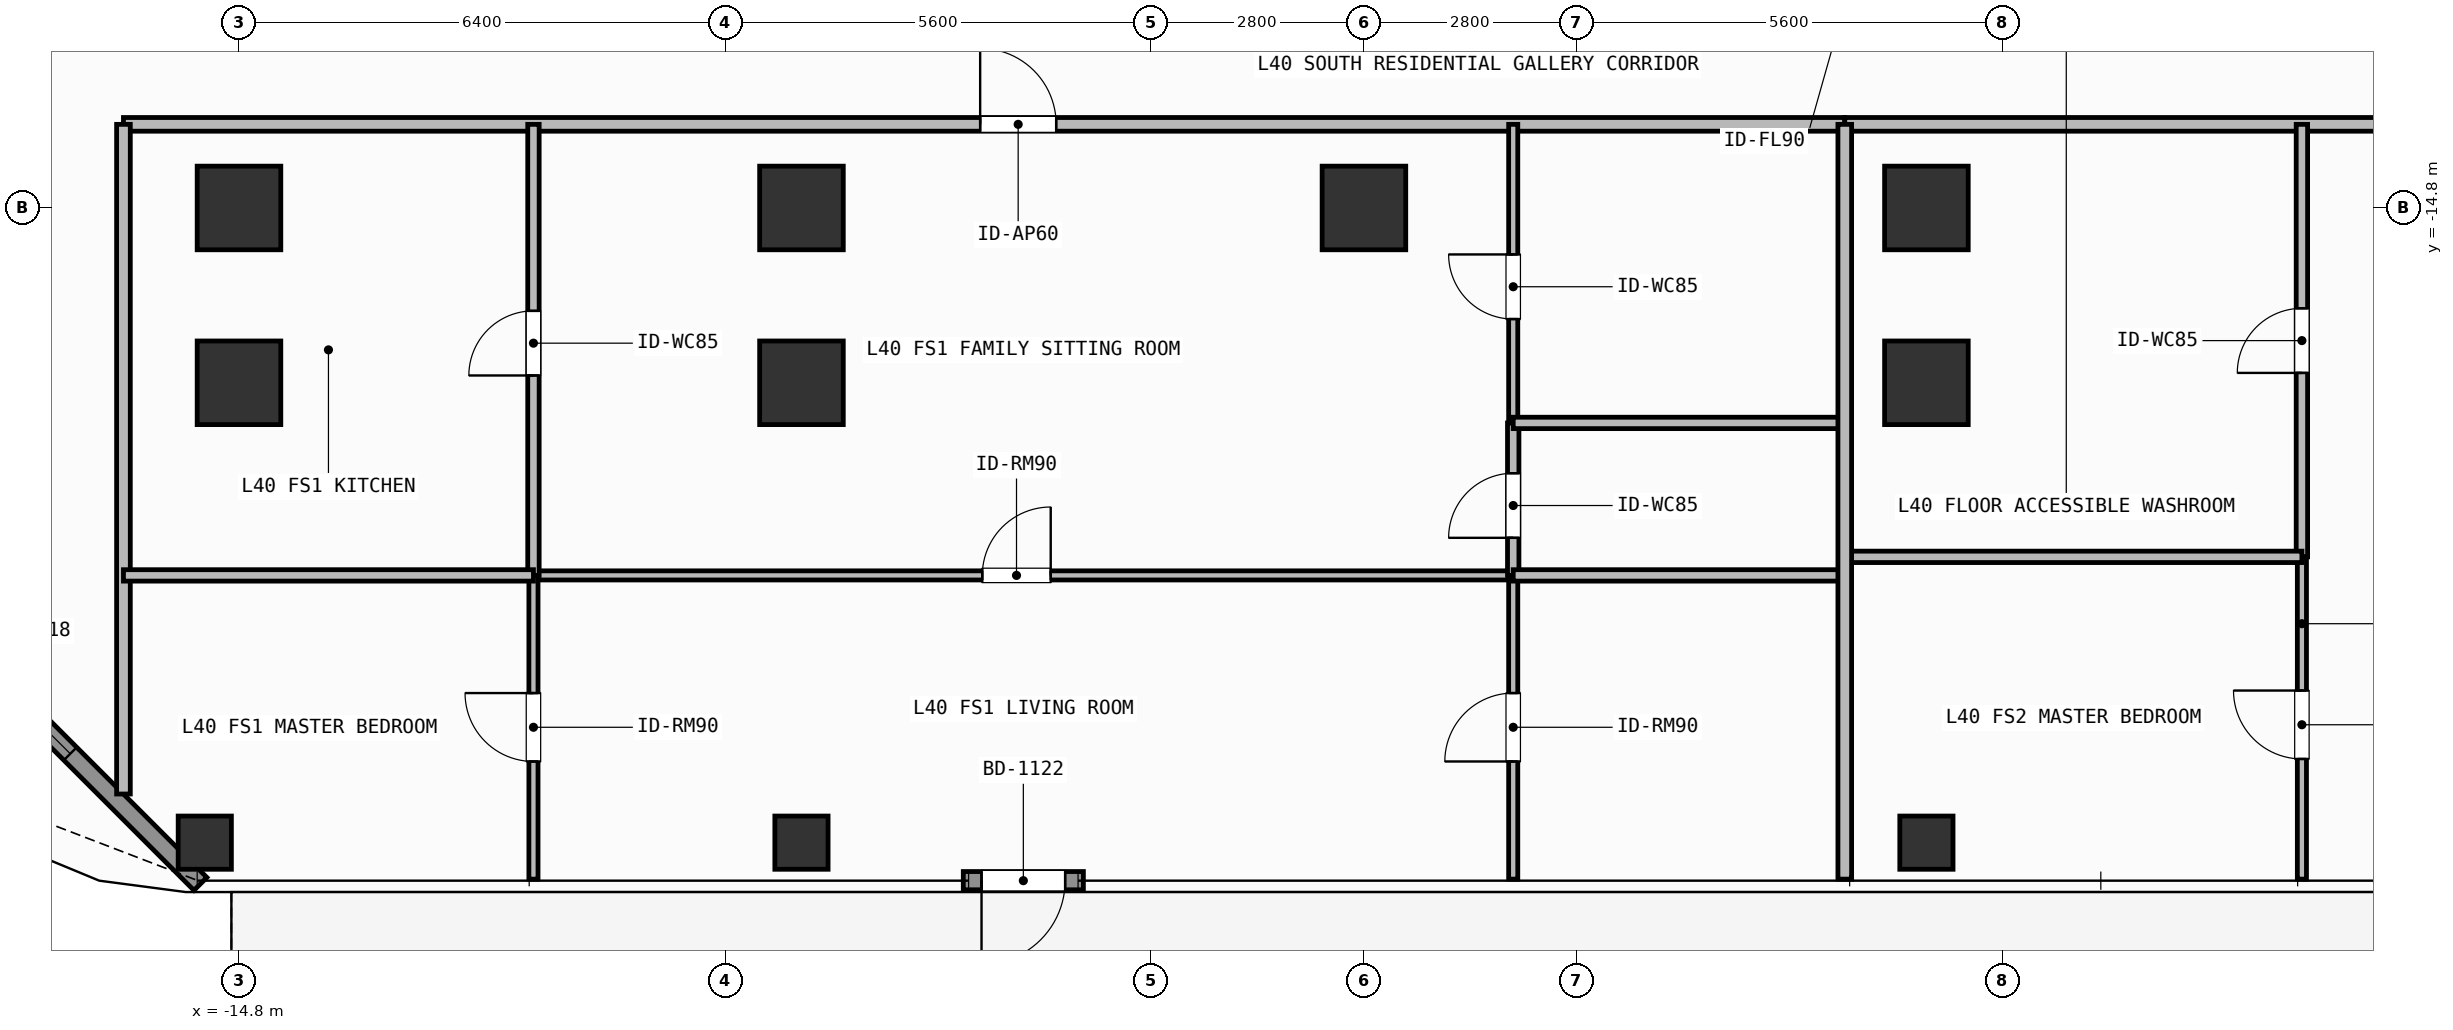
"""IFC4 building model, lengths in metres.
Left out: names, types, materials, properties, quantities, classifications, styles, units other than length and angle.
Written with IfcOpenShell. Run it as: python <this file> out.ifc"""

import sys

from ifc_helpers import new_model, si_unit, direction, frame, frame_2d, origin, origin_2d, place, context, subcontext, project, spatial, rectangle, hollow_rectangle, extrude, element, fill, save


model = new_model("IFC4")
c1 = context("Model", 3, precision=1e-05, world=origin(), true_north=direction((0.0, 1.0)))
c2 = subcontext(c1, "Body", "Model", "MODEL_VIEW")
j1 = project(units=[si_unit("LENGTHUNIT", "METRE"), si_unit("PLANEANGLEUNIT", "RADIAN")], contexts=[c1])
p1 = place(None, origin())
s1 = spatial("IfcSite", under=j1, at=p1, CompositionType="ELEMENT")
p2 = place(p1, origin())
s2 = spatial("IfcBuilding", under=s1, at=p2, CompositionType="ELEMENT")
p3 = place(p2, frame((0.0, 0.0, 164.1)))
s3 = spatial("IfcBuildingStorey", under=s2, at=p3, CompositionType="ELEMENT", Elevation=164.1)
for number, where, z_axis, x_axis in (
    (1, (-14.8, -14.8, 0.0), (0.0, 0.0, 1.0), (1.0, 0.0, 0.0)),
    (2, (-7.4, -14.8, 0.0), (0.0, 0.0, 1.0), (1.0, 0.0, 0.0)),
    (3, (0.0, -14.8, 0.0), (0.0, 0.0, 1.0), (1.0, 0.0, 0.0)),
    (4, (7.4, -14.8, 0.0), (0.0, 0.0, 1.0), (1.0, 0.0, 0.0)),
    (5, (-14.8, -17.1, 0.0), (0.0, 0.0, 1.0), (1.0, 0.0, 0.0)),
    (6, (-7.4, -17.1, 0.0), (0.0, 0.0, 1.0), (1.0, 0.0, 0.0)),
    (7, (7.4, -17.1, 0.0), (0.0, 0.0, 1.0), (1.0, 0.0, 0.0)),
):
    element("IfcColumn", number, at=place(p3, frame(where, z_axis=z_axis, x_axis=x_axis)), inside=s3, PredefinedType="COLUMN", context=c2, shape_type="SweptSolid", body=[
        extrude(rectangle(XDim=1.1, YDim=1.1, at=origin_2d()), origin(), (0.0, 0.0, 1.0), 3.9),
    ])
for number, where, z_axis, x_axis in (
    (8, (-15.25, -23.15, 0.0), (0.0, 0.0, 1.0), (1.0, 0.0, 0.0)),
    (9, (-7.4, -23.15, 0.0), (0.0, 0.0, 1.0), (1.0, 0.0, 0.0)),
    (10, (7.4, -23.15, 0.0), (0.0, 0.0, 1.0), (1.0, 0.0, 0.0)),
):
    element("IfcColumn", number, at=place(p3, frame(where, z_axis=z_axis, x_axis=x_axis)), inside=s3, PredefinedType="COLUMN", context=c2, shape_type="SweptSolid", body=[
        extrude(hollow_rectangle(XDim=0.7, YDim=0.7, WallThickness=0.032, at=origin_2d()), origin(), (0.0, 0.0, 1.0), 3.9),
    ])
p4 = place(p3, frame((-3.691, -23.65, 0.0), z_axis=(0.0, 0.0, 1.0), x_axis=(-1.0, 0.0, 0.0)))
e11 = element("IfcWall", 11, at=p4, inside=s3, PredefinedType="SOLIDWALL", context=c2, shape_type="SweptSolid", body=[
    extrude(rectangle(XDim=1.58, YDim=0.24, at=frame_2d((0.79, 0.0))), origin(), (0.0, 0.0, 1.0), 3.62),
])
p5 = place(p4, frame((0.24, 0.0, 0.0)))
e12 = element("IfcOpeningElement", 12, at=p5, cuts=e11, PredefinedType="OPENING", context=c2, shape_type="SweptSolid", body=[
    extrude(rectangle(XDim=1.1, YDim=2.2, at=frame_2d((0.55, 1.1))), frame((0.0, 0.13, 0.0), z_axis=(0.0, -1.0, 0.0), x_axis=(1.0, 0.0, 0.0)), (0.0, 0.0, 1.0), 0.26),
])
p6 = place(p3, frame((-15.308, -23.692, 0.0), z_axis=(0.0, 0.0, 1.0), x_axis=(-0.707106781187, 0.707106781187, 0.0)))
e13 = element("IfcWall", 13, at=p6, inside=s3, PredefinedType="SOLIDWALL", context=c2, shape_type="SweptSolid", body=[
    extrude(rectangle(XDim=6.343, YDim=0.24, at=frame_2d((3.171, 0.0))), origin(), (0.0, 0.0, 1.0), 3.62),
])
p7 = place(p6, frame((2.421, 0.0, 0.8)))
e14 = element("IfcOpeningElement", 14, at=p7, cuts=e13, PredefinedType="OPENING", context=c2, shape_type="SweptSolid", body=[
    extrude(rectangle(XDim=1.5, YDim=1.85, at=frame_2d((0.75, 0.925))), frame((0.0, 0.13, 0.0), z_axis=(0.0, -1.0, 0.0), x_axis=(1.0, 0.0, 0.0)), (0.0, 0.0, 1.0), 0.26),
])
p8 = place(p3, frame((-16.32, -13.7, 0.0), z_axis=(0.0, 0.0, 1.0), x_axis=(1.0, 0.0, 0.0)))
e15 = element("IfcWall", 15, at=p8, inside=s3, PredefinedType="PARTITIONING", context=c2, shape_type="SweptSolid", body=[
    extrude(rectangle(XDim=22.646, YDim=0.18, at=frame_2d((11.323, 0.0))), origin(), (0.0, 0.0, 1.0), 3.62),
])
p9 = place(p8, frame((11.271, 0.0, 0.0)))
e16 = element("IfcOpeningElement", 16, at=p9, cuts=e15, PredefinedType="OPENING", context=c2, shape_type="SweptSolid", body=[
    extrude(rectangle(XDim=1.0, YDim=2.2, at=frame_2d((0.5, 1.1))), frame((0.0, 0.1, 0.0), z_axis=(0.0, -1.0, 0.0), x_axis=(1.0, 0.0, 0.0)), (0.0, 0.0, 1.0), 0.2),
])
p10 = place(p3, frame((-10.926, -19.634, 0.0), z_axis=(0.0, 0.0, 1.0), x_axis=(1.0, 0.0, 0.0)))
e17 = element("IfcWall", 17, at=p10, inside=s3, PredefinedType="PARTITIONING", context=c2, shape_type="SweptSolid", body=[
    extrude(rectangle(XDim=12.89, YDim=0.12, at=frame_2d((6.445, 0.0))), origin(), (0.0, 0.0, 1.0), 3.62),
])
p11 = place(p10, frame((5.905, 0.0, 0.0)))
e18 = element("IfcOpeningElement", 18, at=p11, cuts=e17, PredefinedType="OPENING", context=c2, shape_type="SweptSolid", body=[
    extrude(rectangle(XDim=0.9, YDim=2.1, at=frame_2d((0.45, 1.05))), frame((0.0, 0.07, 0.0), z_axis=(0.0, -1.0, 0.0), x_axis=(1.0, 0.0, 0.0)), (0.0, 0.0, 1.0), 0.14),
])
p12 = place(p3, frame((-10.926, -19.634, 0.0), z_axis=(0.0, 0.0, 1.0), x_axis=(0.0, 1.0, 0.0)))
e19 = element("IfcWall", 19, at=p12, inside=s3, PredefinedType="PARTITIONING", context=c2, shape_type="SweptSolid", body=[
    extrude(rectangle(XDim=5.934, YDim=0.15, at=frame_2d((2.967, 0.0))), origin(), (0.0, 0.0, 1.0), 3.31),
])
p13 = place(p12, frame((2.63, 0.0, 0.0)))
e20 = element("IfcOpeningElement", 20, at=p13, cuts=e19, PredefinedType="OPENING", context=c2, shape_type="SweptSolid", body=[
    extrude(rectangle(XDim=0.85, YDim=2.1, at=frame_2d((0.425, 1.05))), frame((0.0, 0.085, 0.0), z_axis=(0.0, -1.0, 0.0), x_axis=(1.0, 0.0, 0.0)), (0.0, 0.0, 1.0), 0.17),
])
p14 = place(p3, frame((-10.926, -23.63, 0.0), z_axis=(0.0, 0.0, 1.0), x_axis=(0.0, 1.0, 0.0)))
e21 = element("IfcWall", 21, at=p14, inside=s3, PredefinedType="PARTITIONING", context=c2, shape_type="SweptSolid", body=[
    extrude(rectangle(XDim=3.996, YDim=0.12, at=frame_2d((1.998, 0.0))), origin(), (0.0, 0.0, 1.0), 3.31),
])
p15 = place(p14, frame((1.548, 0.0, 0.0)))
e22 = element("IfcOpeningElement", 22, at=p15, cuts=e21, PredefinedType="OPENING", context=c2, shape_type="SweptSolid", body=[
    extrude(rectangle(XDim=0.9, YDim=2.1, at=frame_2d((0.45, 1.05))), frame((0.0, 0.07, 0.0), z_axis=(0.0, -1.0, 0.0), x_axis=(1.0, 0.0, 0.0)), (0.0, 0.0, 1.0), 0.14),
])
p16 = place(p3, frame((1.964, -19.634, 0.0), z_axis=(0.0, 0.0, 1.0), x_axis=(0.0, 1.0, 0.0)))
e23 = element("IfcWall", 23, at=p16, inside=s3, PredefinedType="PARTITIONING", context=c2, shape_type="SweptSolid", body=[
    extrude(rectangle(XDim=2.006, YDim=0.15, at=frame_2d((1.003, 0.0))), origin(), (0.0, 0.0, 1.0), 3.62),
])
p17 = place(p16, frame((0.494, 0.0, 0.0)))
e24 = element("IfcOpeningElement", 24, at=p17, cuts=e23, PredefinedType="OPENING", context=c2, shape_type="SweptSolid", body=[
    extrude(rectangle(XDim=0.85, YDim=2.1, at=frame_2d((0.425, 1.05))), frame((0.0, 0.085, 0.0), z_axis=(0.0, -1.0, 0.0), x_axis=(1.0, 0.0, 0.0)), (0.0, 0.0, 1.0), 0.17),
])
p18 = place(p3, frame((1.964, -17.628, 0.0), z_axis=(0.0, 0.0, 1.0), x_axis=(0.0, 1.0, 0.0)))
e25 = element("IfcWall", 25, at=p18, inside=s3, PredefinedType="PARTITIONING", context=c2, shape_type="SweptSolid", body=[
    extrude(rectangle(XDim=3.928, YDim=0.12, at=frame_2d((1.964, 0.0))), origin(), (0.0, 0.0, 1.0), 3.62),
])
p19 = place(p18, frame((1.367, 0.0, 0.0)))
e26 = element("IfcOpeningElement", 26, at=p19, cuts=e25, PredefinedType="OPENING", context=c2, shape_type="SweptSolid", body=[
    extrude(rectangle(XDim=0.85, YDim=2.1, at=frame_2d((0.425, 1.05))), frame((0.0, 0.07, 0.0), z_axis=(0.0, -1.0, 0.0), x_axis=(1.0, 0.0, 0.0)), (0.0, 0.0, 1.0), 0.14),
])
p20 = place(p3, frame((1.964, -23.63, 0.0), z_axis=(0.0, 0.0, 1.0), x_axis=(0.0, 1.0, 0.0)))
e27 = element("IfcWall", 27, at=p20, inside=s3, PredefinedType="PARTITIONING", context=c2, shape_type="SweptSolid", body=[
    extrude(rectangle(XDim=3.996, YDim=0.12, at=frame_2d((1.998, 0.0))), origin(), (0.0, 0.0, 1.0), 3.62),
])
p21 = place(p20, frame((1.548, 0.0, 0.0)))
e28 = element("IfcOpeningElement", 28, at=p21, cuts=e27, PredefinedType="OPENING", context=c2, shape_type="SweptSolid", body=[
    extrude(rectangle(XDim=0.9, YDim=2.1, at=frame_2d((0.45, 1.05))), frame((0.0, 0.07, 0.0), z_axis=(0.0, -1.0, 0.0), x_axis=(1.0, 0.0, 0.0)), (0.0, 0.0, 1.0), 0.14),
])
p22 = place(p3, frame((6.326, -13.7, 0.0), z_axis=(0.0, 0.0, 1.0), x_axis=(1.0, 0.0, 0.0)))
e29 = element("IfcWall", 29, at=p22, inside=s3, PredefinedType="PARTITIONING", context=c2, shape_type="SweptSolid", body=[
    extrude(rectangle(XDim=17.794, YDim=0.18, at=frame_2d((8.897, 0.0))), origin(), (0.0, 0.0, 1.0), 3.62),
])
p23 = place(p22, frame((9.113, 0.0, 0.0)))
e30 = element("IfcOpeningElement", 30, at=p23, cuts=e29, PredefinedType="OPENING", context=c2, shape_type="SweptSolid", body=[
    extrude(rectangle(XDim=1.0, YDim=2.2, at=frame_2d((0.5, 1.1))), frame((0.0, 0.1, 0.0), z_axis=(0.0, -1.0, 0.0), x_axis=(1.0, 0.0, 0.0)), (0.0, 0.0, 1.0), 0.2),
])
p24 = place(p3, frame((12.34, -19.39, 0.0), z_axis=(0.0, 0.0, 1.0), x_axis=(0.0, 1.0, 0.0)))
e31 = element("IfcWall", 31, at=p24, inside=s3, PredefinedType="PARTITIONING", context=c2, shape_type="SweptSolid", body=[
    extrude(rectangle(XDim=5.69, YDim=0.15, at=frame_2d((2.845, 0.0))), origin(), (0.0, 0.0, 1.0), 3.62),
])
p25 = place(p24, frame((2.42, 0.0, 0.0)))
e32 = element("IfcOpeningElement", 32, at=p25, cuts=e31, PredefinedType="OPENING", context=c2, shape_type="SweptSolid", body=[
    extrude(rectangle(XDim=0.85, YDim=2.1, at=frame_2d((0.425, 1.05))), frame((0.0, 0.085, 0.0), z_axis=(0.0, -1.0, 0.0), x_axis=(1.0, 0.0, 0.0)), (0.0, 0.0, 1.0), 0.17),
])
p26 = place(p3, frame((12.34, -23.63, 0.0), z_axis=(0.0, 0.0, 1.0), x_axis=(0.0, 1.0, 0.0)))
e33 = element("IfcWall", 33, at=p26, inside=s3, PredefinedType="PARTITIONING", context=c2, shape_type="SweptSolid", body=[
    extrude(rectangle(XDim=4.24, YDim=0.12, at=frame_2d((2.12, 0.0))), origin(), (0.0, 0.0, 1.0), 3.62),
])
p27 = place(p26, frame((1.581, 0.0, 0.0)))
e34 = element("IfcOpeningElement", 34, at=p27, cuts=e33, PredefinedType="OPENING", context=c2, shape_type="SweptSolid", body=[
    extrude(rectangle(XDim=0.9, YDim=2.1, at=frame_2d((0.45, 1.05))), frame((0.0, 0.07, 0.0), z_axis=(0.0, -1.0, 0.0), x_axis=(1.0, 0.0, 0.0)), (0.0, 0.0, 1.0), 0.14),
])
p28 = place(p3, frame((-16.32, -22.51, 0.0), z_axis=(0.0, 0.0, 1.0), x_axis=(0.0, 1.0, 0.0)))
e35 = element("IfcWall", 35, at=p28, inside=s3, PredefinedType="PARTITIONING", context=c2, shape_type="SweptSolid", body=[
    extrude(rectangle(XDim=8.81, YDim=0.18, at=frame_2d((4.405, 0.0))), origin(), (0.0, 0.0, 1.0), 3.62),
])
p29 = place(p3, frame((-16.32, -19.634, 0.0), z_axis=(0.0, 0.0, 1.0), x_axis=(1.0, 0.0, 0.0)))
e36 = element("IfcWall", 36, at=p29, inside=s3, PredefinedType="PARTITIONING", context=c2, shape_type="SweptSolid", body=[
    extrude(rectangle(XDim=5.394, YDim=0.15, at=frame_2d((2.697, 0.0))), origin(), (0.0, 0.0, 1.0), 3.62),
])
for number, where, z_axis, x_axis in (
    (37, (1.964, -17.628, 0.0), (0.0, 0.0, 1.0), (1.0, 0.0, 0.0)),
    (38, (1.964, -19.634, 0.0), (0.0, 0.0, 1.0), (1.0, 0.0, 0.0)),
):
    element("IfcWall", number, at=place(p3, frame(where, z_axis=z_axis, x_axis=x_axis)), inside=s3, PredefinedType="PARTITIONING", context=c2, shape_type="SweptSolid", body=[
        extrude(rectangle(XDim=4.362, YDim=0.15, at=frame_2d((2.181, 0.0))), origin(), (0.0, 0.0, 1.0), 3.62),
    ])
p30 = place(p3, frame((6.326, -19.39, 0.0), z_axis=(0.0, 0.0, 1.0), x_axis=(1.0, 0.0, 0.0)))
e39 = element("IfcWall", 39, at=p30, inside=s3, PredefinedType="PARTITIONING", context=c2, shape_type="SweptSolid", body=[
    extrude(rectangle(XDim=6.014, YDim=0.15, at=frame_2d((3.007, 0.0))), origin(), (0.0, 0.0, 1.0), 3.62),
])
p31 = place(p3, frame((6.326, -23.63, 0.0), z_axis=(0.0, 0.0, 1.0), x_axis=(0.0, 1.0, 0.0)))
e40 = element("IfcWall", 40, at=p31, inside=s3, PredefinedType="PARTITIONING", context=c2, shape_type="SweptSolid", body=[
    extrude(rectangle(XDim=9.93, YDim=0.18, at=frame_2d((4.965, 0.0))), origin(), (0.0, 0.0, 1.0), 3.62),
])
p32 = place(p5, origin())
e41 = element("IfcDoor", 41, at=p32, inside=s3, OperationType="SINGLE_SWING_RIGHT", PredefinedType="DOOR", context=c2, shape_type="SweptSolid", body=[
    extrude(rectangle(XDim=1.1, YDim=2.2, at=frame_2d((0.55, 1.1))), frame((0.0, 0.025, 0.0), z_axis=(0.0, -1.0, 0.0), x_axis=(1.0, 0.0, 0.0)), (0.0, 0.0, 1.0), 0.05),
])
fill(e12, e41)
p33 = place(p7, origin())
e42 = element("IfcWindow", 42, at=p33, inside=s3, PartitioningType="SINGLE_PANEL", PredefinedType="WINDOW", context=c2, shape_type="SweptSolid", body=[
    extrude(rectangle(XDim=1.5, YDim=1.85, at=frame_2d((0.75, 0.925))), frame((0.0, 0.03, 0.0), z_axis=(0.0, -1.0, 0.0), x_axis=(1.0, 0.0, 0.0)), (0.0, 0.0, 1.0), 0.06),
])
fill(e14, e42)
p34 = place(p9, origin())
e43 = element("IfcDoor", 43, at=p34, inside=s3, OperationType="SINGLE_SWING_LEFT", PredefinedType="DOOR", context=c2, shape_type="SweptSolid", body=[
    extrude(rectangle(XDim=1.0, YDim=2.2, at=frame_2d((0.5, 1.1))), frame((0.0, 0.025, 0.0), z_axis=(0.0, -1.0, 0.0), x_axis=(1.0, 0.0, 0.0)), (0.0, 0.0, 1.0), 0.05),
])
fill(e16, e43)
p35 = place(p11, origin())
e44 = element("IfcDoor", 44, at=p35, inside=s3, OperationType="SINGLE_SWING_RIGHT", PredefinedType="DOOR", context=c2, shape_type="SweptSolid", body=[
    extrude(rectangle(XDim=0.9, YDim=2.1, at=frame_2d((0.45, 1.05))), frame((0.0, 0.025, 0.0), z_axis=(0.0, -1.0, 0.0), x_axis=(1.0, 0.0, 0.0)), (0.0, 0.0, 1.0), 0.05),
])
fill(e18, e44)
p36 = place(p13, origin())
e45 = element("IfcDoor", 45, at=p36, inside=s3, OperationType="SINGLE_SWING_LEFT", PredefinedType="DOOR", context=c2, shape_type="SweptSolid", body=[
    extrude(rectangle(XDim=0.85, YDim=2.1, at=frame_2d((0.425, 1.05))), frame((0.0, 0.025, 0.0), z_axis=(0.0, -1.0, 0.0), x_axis=(1.0, 0.0, 0.0)), (0.0, 0.0, 1.0), 0.05),
])
fill(e20, e45)
p37 = place(p15, origin())
e46 = element("IfcDoor", 46, at=p37, inside=s3, OperationType="SINGLE_SWING_RIGHT", PredefinedType="DOOR", context=c2, shape_type="SweptSolid", body=[
    extrude(rectangle(XDim=0.9, YDim=2.1, at=frame_2d((0.45, 1.05))), frame((0.0, 0.025, 0.0), z_axis=(0.0, -1.0, 0.0), x_axis=(1.0, 0.0, 0.0)), (0.0, 0.0, 1.0), 0.05),
])
fill(e22, e46)
p38 = place(p17, origin())
e47 = element("IfcDoor", 47, at=p38, inside=s3, OperationType="SINGLE_SWING_LEFT", PredefinedType="DOOR", context=c2, shape_type="SweptSolid", body=[
    extrude(rectangle(XDim=0.85, YDim=2.1, at=frame_2d((0.425, 1.05))), frame((0.0, 0.025, 0.0), z_axis=(0.0, -1.0, 0.0), x_axis=(1.0, 0.0, 0.0)), (0.0, 0.0, 1.0), 0.05),
])
fill(e24, e47)
p39 = place(p19, origin())
e48 = element("IfcDoor", 48, at=p39, inside=s3, OperationType="SINGLE_SWING_RIGHT", PredefinedType="DOOR", context=c2, shape_type="SweptSolid", body=[
    extrude(rectangle(XDim=0.85, YDim=2.1, at=frame_2d((0.425, 1.05))), frame((0.0, 0.025, 0.0), z_axis=(0.0, -1.0, 0.0), x_axis=(1.0, 0.0, 0.0)), (0.0, 0.0, 1.0), 0.05),
])
fill(e26, e48)
p40 = place(p21, origin())
e49 = element("IfcDoor", 49, at=p40, inside=s3, OperationType="SINGLE_SWING_LEFT", PredefinedType="DOOR", context=c2, shape_type="SweptSolid", body=[
    extrude(rectangle(XDim=0.9, YDim=2.1, at=frame_2d((0.45, 1.05))), frame((0.0, 0.025, 0.0), z_axis=(0.0, -1.0, 0.0), x_axis=(1.0, 0.0, 0.0)), (0.0, 0.0, 1.0), 0.05),
])
fill(e28, e49)
p41 = place(p25, origin())
e50 = element("IfcDoor", 50, at=p41, inside=s3, OperationType="SINGLE_SWING_LEFT", PredefinedType="DOOR", context=c2, shape_type="SweptSolid", body=[
    extrude(rectangle(XDim=0.85, YDim=2.1, at=frame_2d((0.425, 1.05))), frame((0.0, 0.025, 0.0), z_axis=(0.0, -1.0, 0.0), x_axis=(1.0, 0.0, 0.0)), (0.0, 0.0, 1.0), 0.05),
])
fill(e32, e50)
p42 = place(p27, origin())
e51 = element("IfcDoor", 51, at=p42, inside=s3, OperationType="SINGLE_SWING_RIGHT", PredefinedType="DOOR", context=c2, shape_type="SweptSolid", body=[
    extrude(rectangle(XDim=0.9, YDim=2.1, at=frame_2d((0.45, 1.05))), frame((0.0, 0.025, 0.0), z_axis=(0.0, -1.0, 0.0), x_axis=(1.0, 0.0, 0.0)), (0.0, 0.0, 1.0), 0.05),
])
fill(e34, e51)
save(model, sys.argv[1])
